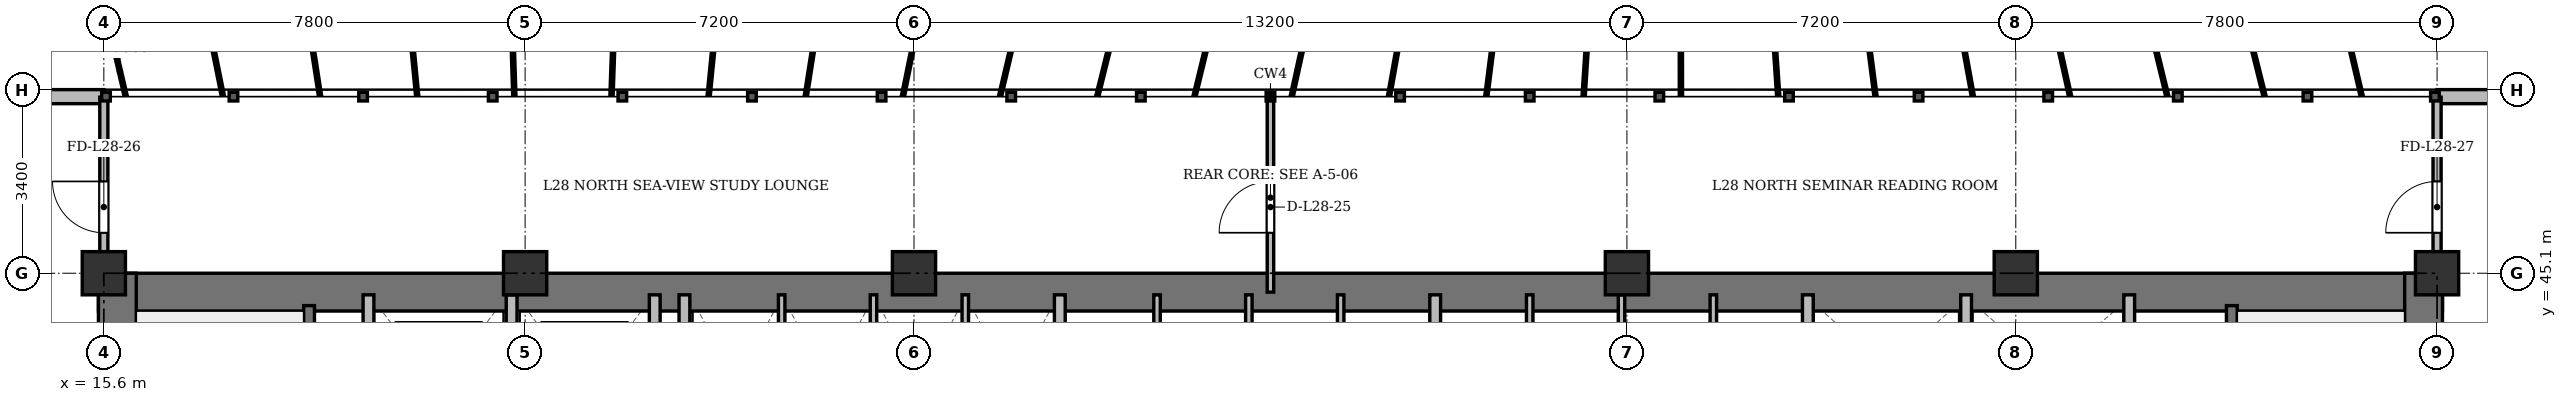
"""IFC4 building model, lengths in metres.
Left out: names, types, materials, properties, quantities, classifications, styles, units other than length and angle.
Written with IfcOpenShell. Run it as: python <this file> out.ifc"""

import sys

from ifc_helpers import new_model, si_unit, direction, frame, frame_2d, origin, origin_2d, place, context, subcontext, project, spatial, rectangle, extrude, source, transform, mapped, element, fill, save


model = new_model("IFC4")
c1 = context("Model", 3, precision=1e-05, world=origin(), true_north=direction((0.0, 1.0)))
c2 = subcontext(c1, "Body", "Model", "MODEL_VIEW")
j1 = project(units=[si_unit("LENGTHUNIT", "METRE"), si_unit("PLANEANGLEUNIT", "RADIAN")], contexts=[c1])
p1 = place(None, origin())
s1 = spatial("IfcSite", under=j1, at=p1, CompositionType="ELEMENT")
p2 = place(p1, origin())
s2 = spatial("IfcBuilding", under=s1, at=p2, CompositionType="ELEMENT")
p3 = place(p2, frame((0.0, 0.0, 110.5)))
s3 = spatial("IfcBuildingStorey", under=s2, at=p3, CompositionType="ELEMENT", Elevation=110.5)
m1 = source(origin(), c2, "Body", "SweptSolid", [
    extrude(rectangle(XDim=0.8, YDim=0.8, at=origin_2d()), origin(), (0.0, 0.0, 1.0), 3.6),
])
for number, where, z_axis, x_axis in (
    (1, (15.6, 45.1, 0.0), (0.0, 0.0, 1.0), (1.0, 0.0, 0.0)),
    (2, (23.4, 45.1, 0.0), (0.0, 0.0, 1.0), (1.0, 0.0, 0.0)),
    (3, (30.6, 45.1, 0.0), (0.0, 0.0, 1.0), (1.0, 0.0, 0.0)),
    (4, (43.8, 45.1, 0.0), (0.0, 0.0, 1.0), (1.0, 0.0, 0.0)),
    (5, (51.0, 45.1, 0.0), (0.0, 0.0, 1.0), (1.0, 0.0, 0.0)),
    (6, (58.8, 45.1, 0.0), (0.0, 0.0, 1.0), (1.0, 0.0, 0.0)),
):
    element("IfcColumn", number, at=place(p3, frame(where, z_axis=z_axis, x_axis=x_axis)), inside=s3, PredefinedType="COLUMN", context=c2, shape_type="MappedRepresentation", body=[
        mapped(m1, transform((0.0, 0.0, 0.0), x_axis=(1.0, 0.0, 0.0), y_axis=(0.0, 1.0, 0.0), z_axis=(0.0, 0.0, 1.0), scale=1.0)),
    ])
p4 = place(p3, frame((7.6, 48.37, 0.0), z_axis=(0.0, 0.0, 1.0), x_axis=(1.0, 0.0, 0.0)))
e7 = element("IfcWall", 7, at=p4, inside=s3, PredefinedType="SOLIDWALL", context=c2, shape_type="SweptSolid", body=[
    extrude(rectangle(XDim=8.0, YDim=0.26, at=frame_2d((4.0, 0.0))), origin(), (0.0, 0.0, 1.0), 3.34),
])
p5 = place(p4, frame((3.308, 0.0, 0.9)))
e8 = element("IfcOpeningElement", 8, at=p5, cuts=e7, PredefinedType="OPENING", context=c2, shape_type="SweptSolid", body=[
    extrude(rectangle(XDim=1.2, YDim=1.65, at=frame_2d((0.6, 0.825))), frame((0.0, 0.14, 0.0), z_axis=(0.0, -1.0, 0.0), x_axis=(1.0, 0.0, 0.0)), (0.0, 0.0, 1.0), 0.28),
])
p6 = place(p3, frame((58.8, 48.37, 0.0), z_axis=(0.0, 0.0, 1.0), x_axis=(1.0, 0.0, 0.0)))
e9 = element("IfcWall", 9, at=p6, inside=s3, PredefinedType="SOLIDWALL", context=c2, shape_type="SweptSolid", body=[
    extrude(rectangle(XDim=8.0, YDim=0.26, at=frame_2d((4.0, 0.0))), origin(), (0.0, 0.0, 1.0), 3.34),
])
p7 = place(p6, frame((3.308, 0.0, 0.9)))
e10 = element("IfcOpeningElement", 10, at=p7, cuts=e9, PredefinedType="OPENING", context=c2, shape_type="SweptSolid", body=[
    extrude(rectangle(XDim=1.2, YDim=1.65, at=frame_2d((0.6, 0.825))), frame((0.0, 0.14, 0.0), z_axis=(0.0, -1.0, 0.0), x_axis=(1.0, 0.0, 0.0)), (0.0, 0.0, 1.0), 0.28),
])
p8 = place(p3, frame((15.5, 44.75, 0.0), z_axis=(0.0, 0.0, 1.0), x_axis=(1.0, 0.0, 0.0)))
e11 = element("IfcWall", 11, at=p8, inside=s3, PredefinedType="SHEAR", context=c2, shape_type="SweptSolid", body=[
    extrude(rectangle(XDim=43.4, YDim=0.7, at=frame_2d((21.7, 0.0))), origin(), (0.0, 0.0, 1.0), 3.34),
])
for number, where, z_axis, x_axis in (
    (12, (15.85, 33.4, 0.0), (0.0, 0.0, 1.0), (0.0, 1.0, 0.0)),
    (13, (58.55, 33.4, 0.0), (0.0, 0.0, 1.0), (0.0, 1.0, 0.0)),
):
    element("IfcWall", number, at=place(p3, frame(where, z_axis=z_axis, x_axis=x_axis)), inside=s3, PredefinedType="SHEAR", context=c2, shape_type="SweptSolid", body=[
        extrude(rectangle(XDim=11.7, YDim=0.7, at=frame_2d((5.85, 0.0))), origin(), (0.0, 0.0, 1.0), 3.34),
    ])
p9 = place(p3, frame((19.4, 33.4, 0.0), z_axis=(0.0, 0.0, 1.0), x_axis=(0.0, 1.0, 0.0)))
e14 = element("IfcWall", 14, at=p9, inside=s3, PredefinedType="SHEAR", context=c2, shape_type="SweptSolid", body=[
    extrude(rectangle(XDim=11.1, YDim=0.2, at=frame_2d((5.55, 0.0))), origin(), (0.0, 0.0, 1.0), 3.34),
])
p10 = place(p9, frame((0.85, 0.0, 0.0)))
e15 = element("IfcOpeningElement", 15, at=p10, cuts=e14, PredefinedType="OPENING", context=c2, shape_type="SweptSolid", body=[
    extrude(rectangle(XDim=1.1, YDim=2.15, at=frame_2d((0.55, 1.075))), frame((0.0, 0.11, 0.0), z_axis=(0.0, -1.0, 0.0), x_axis=(1.0, 0.0, 0.0)), (0.0, 0.0, 1.0), 0.22),
])
p11 = place(p3, frame((55.0, 33.4, 0.0), z_axis=(0.0, 0.0, 1.0), x_axis=(0.0, 1.0, 0.0)))
e16 = element("IfcWall", 16, at=p11, inside=s3, PredefinedType="SHEAR", context=c2, shape_type="SweptSolid", body=[
    extrude(rectangle(XDim=11.1, YDim=0.2, at=frame_2d((5.55, 0.0))), origin(), (0.0, 0.0, 1.0), 3.34),
])
p12 = place(p11, frame((0.85, 0.0, 0.0)))
e17 = element("IfcOpeningElement", 17, at=p12, cuts=e16, PredefinedType="OPENING", context=c2, shape_type="SweptSolid", body=[
    extrude(rectangle(XDim=1.1, YDim=2.15, at=frame_2d((0.55, 1.075))), frame((0.0, 0.11, 0.0), z_axis=(0.0, -1.0, 0.0), x_axis=(1.0, 0.0, 0.0)), (0.0, 0.0, 1.0), 0.22),
])
for number, where, z_axis, x_axis in (
    (18, (20.5, 41.3, 0.0), (0.0, 0.0, 1.0), (0.0, 1.0, 0.0)),
    (19, (23.15, 41.3, 0.0), (0.0, 0.0, 1.0), (0.0, 1.0, 0.0)),
    (20, (25.8, 41.3, 0.0), (0.0, 0.0, 1.0), (0.0, 1.0, 0.0)),
):
    element("IfcWall", number, at=place(p3, frame(where, z_axis=z_axis, x_axis=x_axis)), inside=s3, PredefinedType="SOLIDWALL", context=c2, shape_type="SweptSolid", body=[
        extrude(rectangle(XDim=3.4, YDim=0.2, at=frame_2d((1.7, 0.0))), origin(), (0.0, 0.0, 1.0), 3.34),
    ])
p13 = place(p3, frame((26.35, 33.4, 0.0), z_axis=(0.0, 0.0, 1.0), x_axis=(0.0, 1.0, 0.0)))
e21 = element("IfcWall", 21, at=p13, inside=s3, PredefinedType="SOLIDWALL", context=c2, shape_type="SweptSolid", body=[
    extrude(rectangle(XDim=11.3, YDim=0.2, at=frame_2d((5.65, 0.0))), origin(), (0.0, 0.0, 1.0), 2.752),
])
p14 = place(p3, frame((33.3, 41.5, 0.0), z_axis=(0.0, 0.0, 1.0), x_axis=(0.0, 1.0, 0.0)))
e22 = element("IfcWall", 22, at=p14, inside=s3, PredefinedType="SOLIDWALL", context=c2, shape_type="SweptSolid", body=[
    extrude(rectangle(XDim=3.2, YDim=0.2, at=frame_2d((1.6, 0.0))), origin(), (0.0, 0.0, 1.0), 3.34),
])
for number, where, z_axis, x_axis in (
    (23, (28.15, 41.5, 0.0), (0.0, 0.0, 1.0), (0.0, 1.0, 0.0)),
    (24, (29.85, 41.5, 0.0), (0.0, 0.0, 1.0), (0.0, 1.0, 0.0)),
    (25, (31.55, 41.5, 0.0), (0.0, 0.0, 1.0), (0.0, 1.0, 0.0)),
    (26, (35.1, 41.5, 0.0), (0.0, 0.0, 1.0), (0.0, 1.0, 0.0)),
    (27, (36.8, 41.5, 0.0), (0.0, 0.0, 1.0), (0.0, 1.0, 0.0)),
    (28, (38.5, 41.5, 0.0), (0.0, 0.0, 1.0), (0.0, 1.0, 0.0)),
):
    element("IfcWall", number, at=place(p3, frame(where, z_axis=z_axis, x_axis=x_axis)), inside=s3, PredefinedType="PARTITIONING", context=c2, shape_type="SweptSolid", body=[
        extrude(rectangle(XDim=3.2, YDim=0.12, at=frame_2d((1.6, 0.0))), origin(), (0.0, 0.0, 1.0), 3.34),
    ])
p15 = place(p3, frame((40.25, 41.5, 0.0), z_axis=(0.0, 0.0, 1.0), x_axis=(0.0, 1.0, 0.0)))
e29 = element("IfcWall", 29, at=p15, inside=s3, PredefinedType="SOLIDWALL", context=c2, shape_type="SweptSolid", body=[
    extrude(rectangle(XDim=3.2, YDim=0.2, at=frame_2d((1.6, 0.0))), origin(), (0.0, 0.0, 1.0), 3.34),
])
p16 = place(p3, frame((42.0, 41.5, 0.0), z_axis=(0.0, 0.0, 1.0), x_axis=(0.0, 1.0, 0.0)))
e30 = element("IfcWall", 30, at=p16, inside=s3, PredefinedType="PARTITIONING", context=c2, shape_type="SweptSolid", body=[
    extrude(rectangle(XDim=3.2, YDim=0.12, at=frame_2d((1.6, 0.0))), origin(), (0.0, 0.0, 1.0), 3.34),
])
p17 = place(p3, frame((43.7, 41.5, 0.0), z_axis=(0.0, 0.0, 1.0), x_axis=(0.0, 1.0, 0.0)))
e31 = element("IfcWall", 31, at=p17, inside=s3, PredefinedType="PARTITIONING", context=c2, shape_type="SweptSolid", body=[
    extrude(rectangle(XDim=3.2, YDim=0.12, at=frame_2d((1.6, 0.0))), origin(), (0.0, 0.0, 1.0), 2.84),
])
p18 = place(p3, frame((45.4, 41.5, 0.0), z_axis=(0.0, 0.0, 1.0), x_axis=(0.0, 1.0, 0.0)))
e32 = element("IfcWall", 32, at=p18, inside=s3, PredefinedType="PARTITIONING", context=c2, shape_type="SweptSolid", body=[
    extrude(rectangle(XDim=3.2, YDim=0.12, at=frame_2d((1.6, 0.0))), origin(), (0.0, 0.0, 1.0), 3.34),
])
p19 = place(p3, frame((47.15, 33.4, 0.0), z_axis=(0.0, 0.0, 1.0), x_axis=(0.0, 1.0, 0.0)))
e33 = element("IfcWall", 33, at=p19, inside=s3, PredefinedType="SOLIDWALL", context=c2, shape_type="SweptSolid", body=[
    extrude(rectangle(XDim=11.3, YDim=0.2, at=frame_2d((5.65, 0.0))), origin(), (0.0, 0.0, 1.0), 2.752),
])
for number, where, z_axis, x_axis in (
    (34, (50.08, 42.05, 0.0), (0.0, 0.0, 1.0), (0.0, 1.0, 0.0)),
    (35, (53.1, 42.05, 0.0), (0.0, 0.0, 1.0), (0.0, 1.0, 0.0)),
):
    element("IfcWall", number, at=place(p3, frame(where, z_axis=z_axis, x_axis=x_axis)), inside=s3, PredefinedType="SOLIDWALL", context=c2, shape_type="SweptSolid", body=[
        extrude(rectangle(XDim=2.65, YDim=0.2, at=frame_2d((1.325, 0.0))), origin(), (0.0, 0.0, 1.0), 3.34),
    ])
p20 = place(p3, frame((37.2, 44.75, 0.0), z_axis=(0.0, 0.0, 1.0), x_axis=(0.0, 1.0, 0.0)))
e36 = element("IfcWall", 36, at=p20, inside=s3, PredefinedType="PARTITIONING", context=c2, shape_type="SweptSolid", body=[
    extrude(rectangle(XDim=3.61, YDim=0.12, at=frame_2d((1.805, 0.0))), origin(), (0.0, 0.0, 1.0), 2.752),
])
p21 = place(p20, frame((1.1, 0.0, 0.0)))
e37 = element("IfcOpeningElement", 37, at=p21, cuts=e36, PredefinedType="OPENING", context=c2, shape_type="SweptSolid", body=[
    extrude(rectangle(XDim=0.95, YDim=2.15, at=frame_2d((0.475, 1.075))), frame((0.0, 0.07, 0.0), z_axis=(0.0, -1.0, 0.0), x_axis=(1.0, 0.0, 0.0)), (0.0, 0.0, 1.0), 0.14),
])
p22 = place(p3, frame((15.6, 44.75, 0.0), z_axis=(0.0, 0.0, 1.0), x_axis=(0.0, 1.0, 0.0)))
e38 = element("IfcWall", 38, at=p22, inside=s3, PredefinedType="PARTITIONING", context=c2, shape_type="SweptSolid", body=[
    extrude(rectangle(XDim=3.61, YDim=0.15, at=frame_2d((1.805, 0.0))), origin(), (0.0, 0.0, 1.0), 2.84),
])
p23 = place(p22, frame((1.1, 0.0, 0.0)))
e39 = element("IfcOpeningElement", 39, at=p23, cuts=e38, PredefinedType="OPENING", context=c2, shape_type="SweptSolid", body=[
    extrude(rectangle(XDim=0.95, YDim=2.15, at=frame_2d((0.475, 1.075))), frame((0.0, 0.085, 0.0), z_axis=(0.0, -1.0, 0.0), x_axis=(1.0, 0.0, 0.0)), (0.0, 0.0, 1.0), 0.17),
])
p24 = place(p3, frame((58.8, 44.75, 0.0), z_axis=(0.0, 0.0, 1.0), x_axis=(0.0, 1.0, 0.0)))
e40 = element("IfcWall", 40, at=p24, inside=s3, PredefinedType="PARTITIONING", context=c2, shape_type="SweptSolid", body=[
    extrude(rectangle(XDim=3.61, YDim=0.15, at=frame_2d((1.805, 0.0))), origin(), (0.0, 0.0, 1.0), 2.84),
])
p25 = place(p24, frame((1.1, 0.0, 0.0)))
e41 = element("IfcOpeningElement", 41, at=p25, cuts=e40, PredefinedType="OPENING", context=c2, shape_type="SweptSolid", body=[
    extrude(rectangle(XDim=0.95, YDim=2.15, at=frame_2d((0.475, 1.075))), frame((0.0, 0.085, 0.0), z_axis=(0.0, -1.0, 0.0), x_axis=(1.0, 0.0, 0.0)), (0.0, 0.0, 1.0), 0.17),
])
m2 = source(origin(), c2, "Body", "SweptSolid", [
    extrude(rectangle(XDim=0.95, YDim=2.15, at=frame_2d((0.475, 1.075))), frame((0.0, 0.025, 0.0), z_axis=(0.0, -1.0, 0.0), x_axis=(1.0, 0.0, 0.0)), (0.0, 0.0, 1.0), 0.05),
])
p26 = place(p21, origin())
e42 = element("IfcDoor", 42, at=p26, inside=s3, OperationType="SINGLE_SWING_LEFT", PredefinedType="DOOR", context=c2, shape_type="MappedRepresentation", body=[
    mapped(m2, transform((0.0, 0.0, 0.0), x_axis=(1.0, 0.0, 0.0), y_axis=(0.0, 1.0, 0.0), z_axis=(0.0, 0.0, 1.0), scale=1.0)),
])
fill(e37, e42)
p27 = place(p23, origin())
e43 = element("IfcDoor", 43, at=p27, inside=s3, OperationType="SINGLE_SWING_RIGHT", PredefinedType="DOOR", context=c2, shape_type="MappedRepresentation", body=[
    mapped(m2, transform((0.0, 0.0, 0.0), x_axis=(1.0, 0.0, 0.0), y_axis=(0.0, 1.0, 0.0), z_axis=(0.0, 0.0, 1.0), scale=1.0)),
])
fill(e39, e43)
p28 = place(p25, origin())
e44 = element("IfcDoor", 44, at=p28, inside=s3, OperationType="SINGLE_SWING_LEFT", PredefinedType="DOOR", context=c2, shape_type="MappedRepresentation", body=[
    mapped(m2, transform((0.0, 0.0, 0.0), x_axis=(1.0, 0.0, 0.0), y_axis=(0.0, 1.0, 0.0), z_axis=(0.0, 0.0, 1.0), scale=1.0)),
])
fill(e41, e44)
save(model, sys.argv[1])
